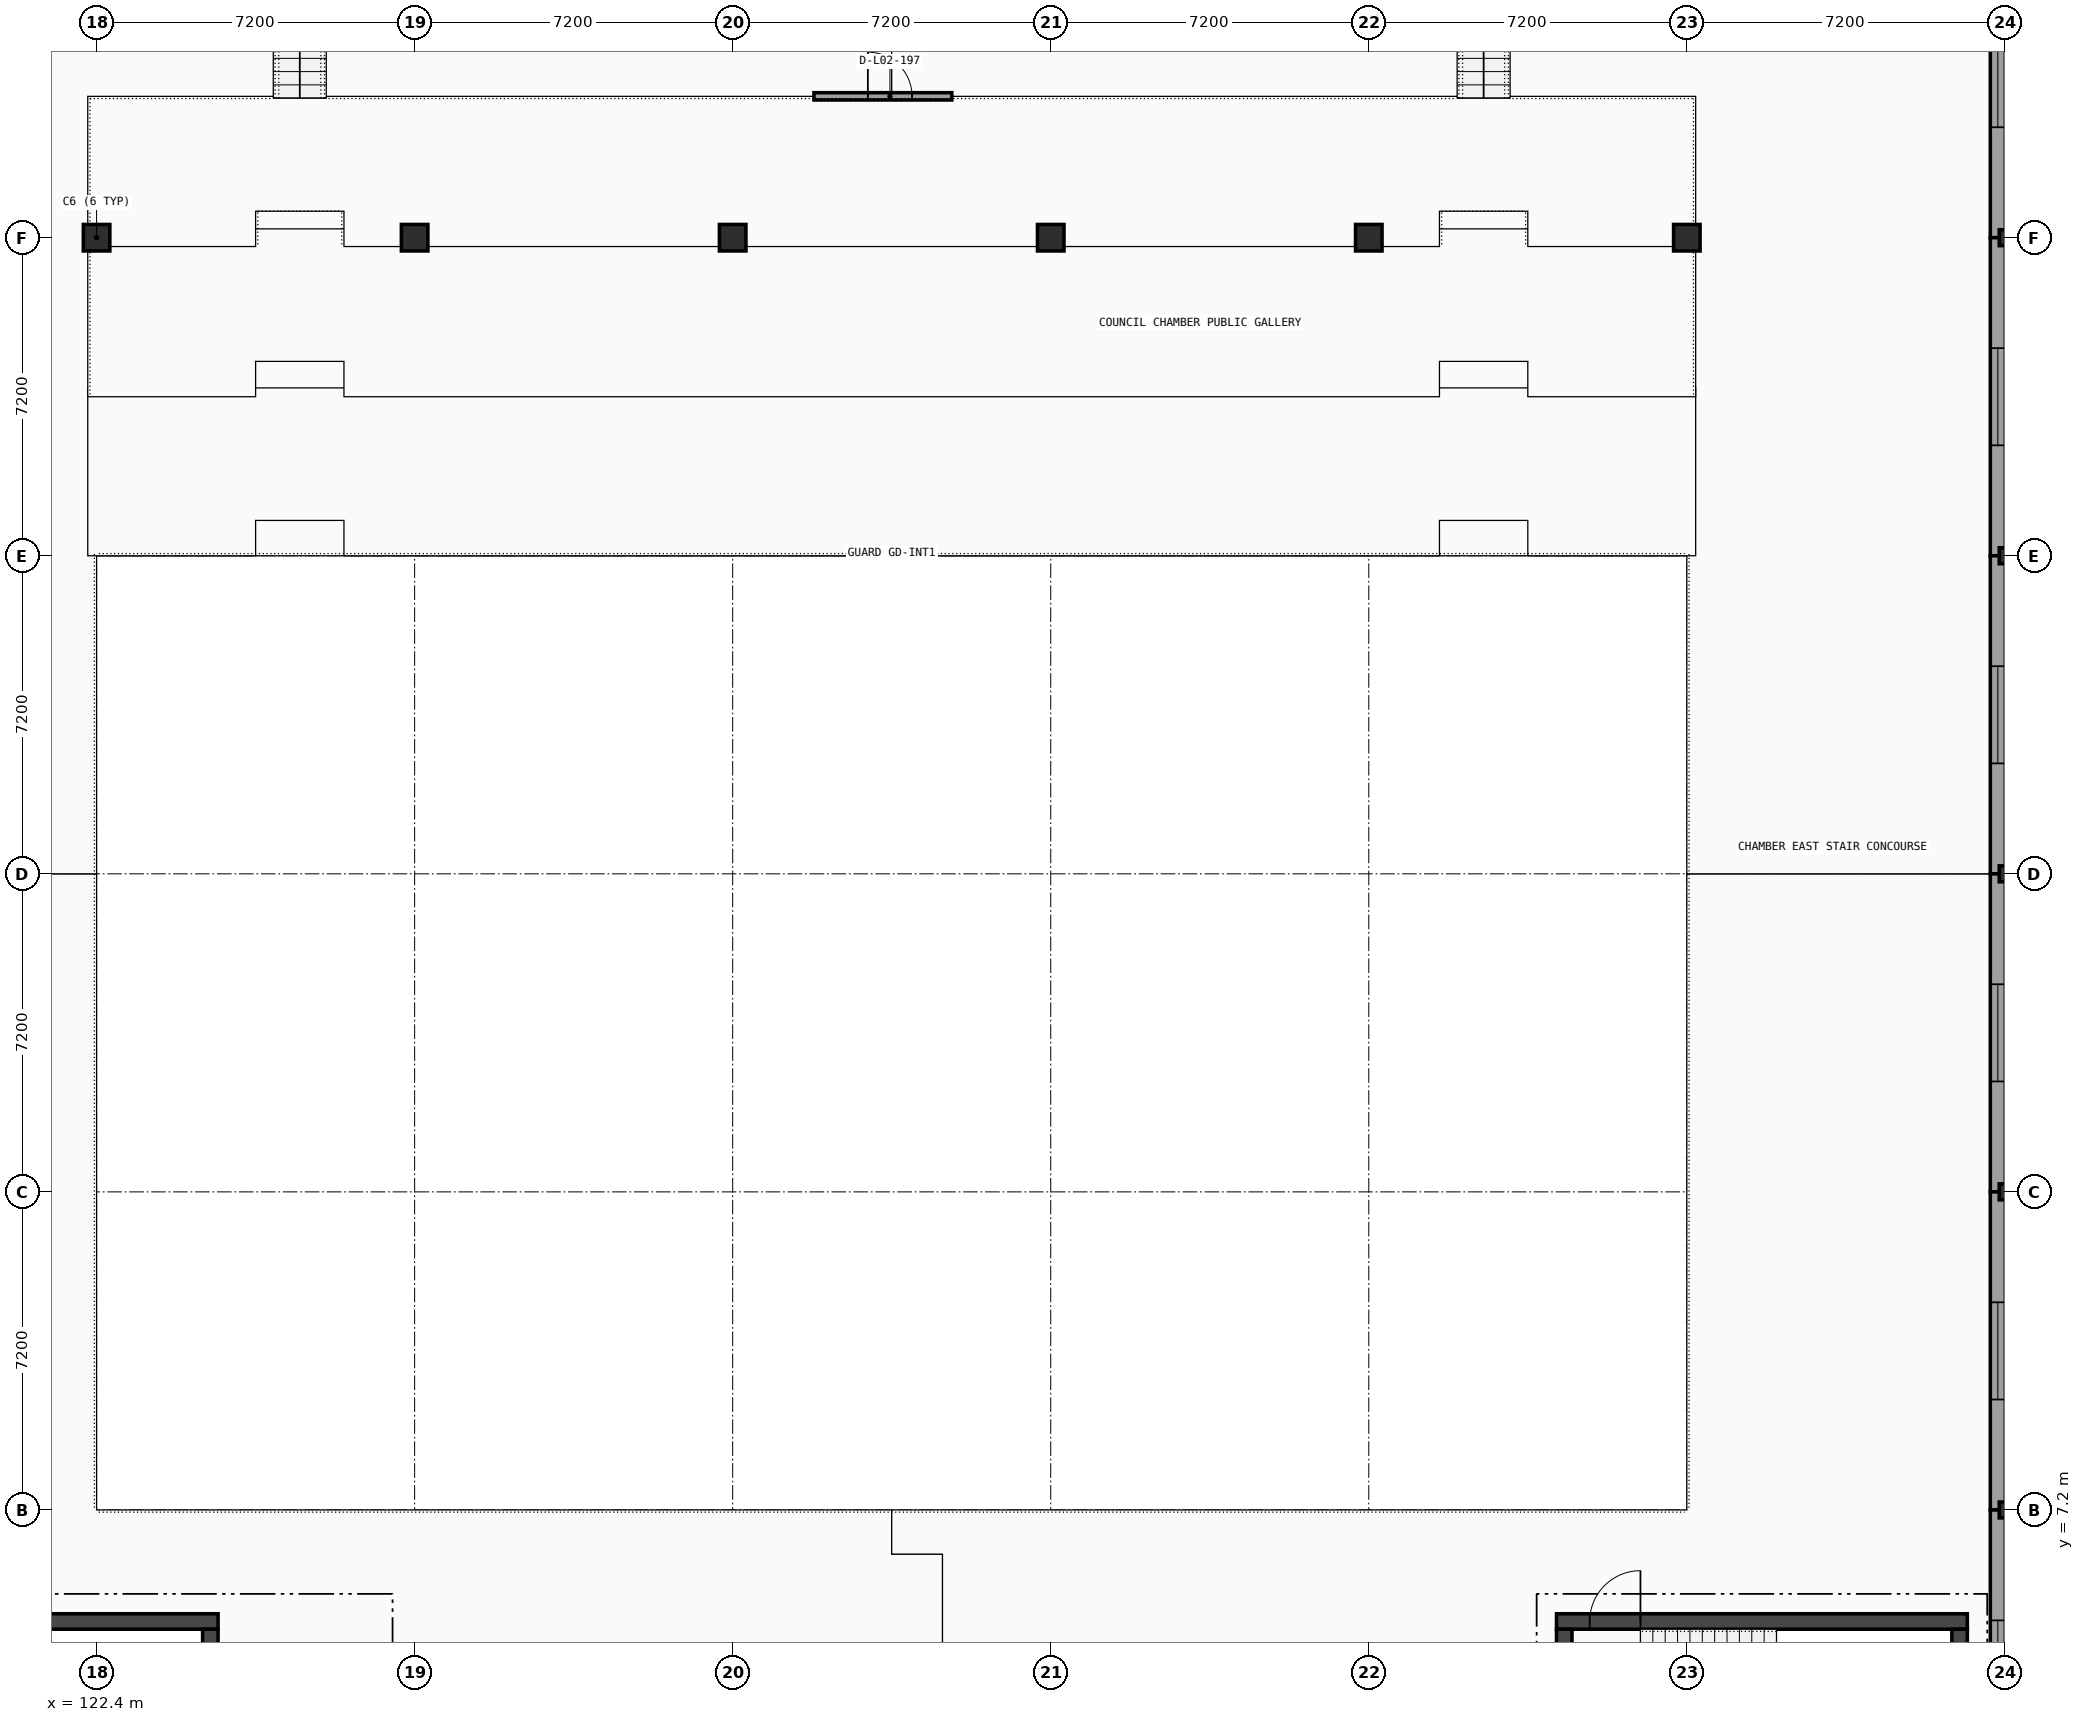
"""IFC4 building model, lengths in metres.
Left out: names, types, materials, properties, quantities, classifications, styles, units other than length and angle.
Written with IfcOpenShell. Run it as: python <this file> out.ifc"""

import sys

from ifc_helpers import new_model, si_unit, direction, frame, frame_2d, origin, origin_2d, place, context, subcontext, project, spatial, rectangle, i_section, extrude, element, fill, save


model = new_model("IFC4")
c1 = context("Model", 3, precision=1e-05, world=origin(), true_north=direction((0.0, 1.0)))
c2 = subcontext(c1, "Body", "Model", "MODEL_VIEW")
j1 = project(units=[si_unit("LENGTHUNIT", "METRE"), si_unit("PLANEANGLEUNIT", "RADIAN")], contexts=[c1])
p1 = place(None, origin())
s1 = spatial("IfcSite", under=j1, at=p1, CompositionType="ELEMENT")
p2 = place(p1, origin())
s2 = spatial("IfcBuilding", under=s1, at=p2, CompositionType="ELEMENT")
p3 = place(p2, frame((0.0, 0.0, 10.2)))
s3 = spatial("IfcBuildingStorey", under=s2, at=p3, CompositionType="ELEMENT", Elevation=10.2)
for number, where, z_axis, x_axis in (
    (1, (122.4, 36.0, 0.0), (0.0, 0.0, 1.0), (1.0, 0.0, 0.0)),
    (2, (158.4, 36.0, 0.0), (0.0, 0.0, 1.0), (1.0, 0.0, 0.0)),
):
    element("IfcColumn", number, at=place(p3, frame(where, z_axis=z_axis, x_axis=x_axis)), inside=s3, PredefinedType="COLUMN", context=c2, shape_type="SweptSolid", body=[
        extrude(rectangle(XDim=0.6, YDim=0.6, at=origin_2d()), origin(), (0.0, 0.0, 1.0), 4.5),
    ])
for number, where, z_axis, x_axis in (
    (3, (165.6, 7.2, 0.0), (0.0, 0.0, 1.0), (1.0, 0.0, 0.0)),
    (4, (165.6, 14.4, 0.0), (0.0, 0.0, 1.0), (1.0, 0.0, 0.0)),
    (5, (165.6, 21.6, 0.0), (0.0, 0.0, 1.0), (1.0, 0.0, 0.0)),
    (6, (165.6, 28.8, 0.0), (0.0, 0.0, 1.0), (1.0, 0.0, 0.0)),
    (7, (165.6, 36.0, 0.0), (0.0, 0.0, 1.0), (1.0, 0.0, 0.0)),
):
    element("IfcColumn", number, at=place(p3, frame(where, z_axis=z_axis, x_axis=x_axis)), inside=s3, PredefinedType="COLUMN", context=c2, shape_type="SweptSolid", body=[
        extrude(i_section(OverallWidth=0.256, OverallDepth=0.36, WebThickness=0.011, FlangeThickness=0.02, FilletRadius=0.015, at=origin_2d()), origin(), (0.0, 0.0, 1.0), 4.5),
    ])
for number, where, z_axis, x_axis in (
    (8, (129.6, 36.0, 0.0), (0.0, 0.0, 1.0), (1.0, 0.0, 0.0)),
    (9, (136.8, 36.0, 0.0), (0.0, 0.0, 1.0), (1.0, 0.0, 0.0)),
    (10, (144.0, 36.0, 0.0), (0.0, 0.0, 1.0), (1.0, 0.0, 0.0)),
    (11, (151.2, 36.0, 0.0), (0.0, 0.0, 1.0), (1.0, 0.0, 0.0)),
):
    element("IfcColumn", number, at=place(p3, frame(where, z_axis=z_axis, x_axis=x_axis)), inside=s3, PredefinedType="COLUMN", context=c2, shape_type="SweptSolid", body=[
        extrude(rectangle(XDim=0.6, YDim=0.6, at=origin_2d()), origin(), (0.0, 0.0, 1.0), 1.28),
    ])
p4 = place(p3, frame((165.44, 43.2, 0.0), z_axis=(0.0, 0.0, 1.0), x_axis=(0.0, -1.0, 0.0)))
e12 = element("IfcWall", 12, at=p4, inside=s3, PredefinedType="SOLIDWALL", context=c2, shape_type="SweptSolid", body=[
    extrude(rectangle(XDim=7.2, YDim=0.34, at=frame_2d((3.6, 0.0))), origin(), (0.0, 0.0, 1.0), 3.471),
])
p5 = place(p4, frame((2.5, 0.0, 1.4)))
e13 = element("IfcOpeningElement", 13, at=p5, cuts=e12, PredefinedType="OPENING", context=c2, shape_type="SweptSolid", body=[
    extrude(rectangle(XDim=2.2, YDim=1.05, at=frame_2d((1.1, 0.525))), frame((0.0, 0.18, 0.0), z_axis=(0.0, -1.0, 0.0), x_axis=(1.0, 0.0, 0.0)), (0.0, 0.0, 1.0), 0.36),
])
p6 = place(p3, frame((165.44, 36.0, 0.0), z_axis=(0.0, 0.0, 1.0), x_axis=(0.0, -1.0, 0.0)))
e14 = element("IfcWall", 14, at=p6, inside=s3, PredefinedType="SOLIDWALL", context=c2, shape_type="SweptSolid", body=[
    extrude(rectangle(XDim=7.2, YDim=0.34, at=frame_2d((3.6, 0.0))), origin(), (0.0, 0.0, 1.0), 3.618),
])
p7 = place(p6, frame((2.5, 0.0, 1.4)))
e15 = element("IfcOpeningElement", 15, at=p7, cuts=e14, PredefinedType="OPENING", context=c2, shape_type="SweptSolid", body=[
    extrude(rectangle(XDim=2.2, YDim=1.05, at=frame_2d((1.1, 0.525))), frame((0.0, 0.18, 0.0), z_axis=(0.0, -1.0, 0.0), x_axis=(1.0, 0.0, 0.0)), (0.0, 0.0, 1.0), 0.36),
])
p8 = place(p3, frame((165.44, 28.8, 0.0), z_axis=(0.0, 0.0, 1.0), x_axis=(0.0, -1.0, 0.0)))
e16 = element("IfcWall", 16, at=p8, inside=s3, PredefinedType="SOLIDWALL", context=c2, shape_type="SweptSolid", body=[
    extrude(rectangle(XDim=7.2, YDim=0.34, at=frame_2d((3.6, 0.0))), origin(), (0.0, 0.0, 1.0), 3.696),
])
p9 = place(p8, frame((2.5, 0.0, 1.4)))
e17 = element("IfcOpeningElement", 17, at=p9, cuts=e16, PredefinedType="OPENING", context=c2, shape_type="SweptSolid", body=[
    extrude(rectangle(XDim=2.2, YDim=1.05, at=frame_2d((1.1, 0.525))), frame((0.0, 0.18, 0.0), z_axis=(0.0, -1.0, 0.0), x_axis=(1.0, 0.0, 0.0)), (0.0, 0.0, 1.0), 0.36),
])
p10 = place(p3, frame((165.44, 21.6, 0.0), z_axis=(0.0, 0.0, 1.0), x_axis=(0.0, -1.0, 0.0)))
e18 = element("IfcWall", 18, at=p10, inside=s3, PredefinedType="SOLIDWALL", context=c2, shape_type="SweptSolid", body=[
    extrude(rectangle(XDim=7.2, YDim=0.34, at=frame_2d((3.6, 0.0))), origin(), (0.0, 0.0, 1.0), 3.696),
])
p11 = place(p10, frame((2.5, 0.0, 1.4)))
e19 = element("IfcOpeningElement", 19, at=p11, cuts=e18, PredefinedType="OPENING", context=c2, shape_type="SweptSolid", body=[
    extrude(rectangle(XDim=2.2, YDim=1.05, at=frame_2d((1.1, 0.525))), frame((0.0, 0.18, 0.0), z_axis=(0.0, -1.0, 0.0), x_axis=(1.0, 0.0, 0.0)), (0.0, 0.0, 1.0), 0.36),
])
p12 = place(p3, frame((165.44, 14.4, 0.0), z_axis=(0.0, 0.0, 1.0), x_axis=(0.0, -1.0, 0.0)))
e20 = element("IfcWall", 20, at=p12, inside=s3, PredefinedType="SOLIDWALL", context=c2, shape_type="SweptSolid", body=[
    extrude(rectangle(XDim=7.2, YDim=0.34, at=frame_2d((3.6, 0.0))), origin(), (0.0, 0.0, 1.0), 3.696),
])
p13 = place(p12, frame((2.5, 0.0, 1.4)))
e21 = element("IfcOpeningElement", 21, at=p13, cuts=e20, PredefinedType="OPENING", context=c2, shape_type="SweptSolid", body=[
    extrude(rectangle(XDim=2.2, YDim=1.05, at=frame_2d((1.1, 0.525))), frame((0.0, 0.18, 0.0), z_axis=(0.0, -1.0, 0.0), x_axis=(1.0, 0.0, 0.0)), (0.0, 0.0, 1.0), 0.36),
])
p14 = place(p3, frame((165.44, 7.2, 0.0), z_axis=(0.0, 0.0, 1.0), x_axis=(0.0, -1.0, 0.0)))
e22 = element("IfcWall", 22, at=p14, inside=s3, PredefinedType="SOLIDWALL", context=c2, shape_type="SweptSolid", body=[
    extrude(rectangle(XDim=7.2, YDim=0.34, at=frame_2d((3.6, 0.0))), origin(), (0.0, 0.0, 1.0), 3.471),
])
p15 = place(p14, frame((2.5, 0.0, 1.4)))
e23 = element("IfcOpeningElement", 23, at=p15, cuts=e22, PredefinedType="OPENING", context=c2, shape_type="SweptSolid", body=[
    extrude(rectangle(XDim=2.2, YDim=1.05, at=frame_2d((1.1, 0.525))), frame((0.0, 0.18, 0.0), z_axis=(0.0, -1.0, 0.0), x_axis=(1.0, 0.0, 0.0)), (0.0, 0.0, 1.0), 0.36),
])
p16 = place(p3, frame((125.15, 4.675, 0.0), z_axis=(0.0, 0.0, 1.0), x_axis=(-1.0, 0.0, 0.0)))
e24 = element("IfcWall", 24, at=p16, inside=s3, PredefinedType="SHEAR", context=c2, shape_type="SweptSolid", body=[
    extrude(rectangle(XDim=9.3, YDim=0.35, at=frame_2d((4.65, 0.0))), origin(), (0.0, 0.0, 1.0), 4.24),
])
p17 = place(p16, frame((7.4, 0.0, 0.0)))
e25 = element("IfcOpeningElement", 25, at=p17, cuts=e24, PredefinedType="OPENING", context=c2, shape_type="SweptSolid", body=[
    extrude(rectangle(XDim=1.15, YDim=2.1, at=frame_2d((0.575, 1.05))), frame((0.0, 0.185, 0.0), z_axis=(0.0, -1.0, 0.0), x_axis=(1.0, 0.0, 0.0)), (0.0, 0.0, 1.0), 0.37),
])
p18 = place(p3, frame((124.975, 1.2, 0.0), z_axis=(0.0, 0.0, 1.0), x_axis=(0.0, 1.0, 0.0)))
e26 = element("IfcWall", 26, at=p18, inside=s3, PredefinedType="SHEAR", context=c2, shape_type="SweptSolid", body=[
    extrude(rectangle(XDim=3.3, YDim=0.35, at=frame_2d((1.65, 0.0))), origin(), (0.0, 0.0, 1.0), 4.24),
])
p19 = place(p3, frame((164.75, 4.675, 0.0), z_axis=(0.0, 0.0, 1.0), x_axis=(-1.0, 0.0, 0.0)))
e27 = element("IfcWall", 27, at=p19, inside=s3, PredefinedType="SHEAR", context=c2, shape_type="SweptSolid", body=[
    extrude(rectangle(XDim=9.3, YDim=0.35, at=frame_2d((4.65, 0.0))), origin(), (0.0, 0.0, 1.0), 4.24),
])
p20 = place(p19, frame((7.4, 0.0, 0.0)))
e28 = element("IfcOpeningElement", 28, at=p20, cuts=e27, PredefinedType="OPENING", context=c2, shape_type="SweptSolid", body=[
    extrude(rectangle(XDim=1.15, YDim=2.1, at=frame_2d((0.575, 1.05))), frame((0.0, 0.185, 0.0), z_axis=(0.0, -1.0, 0.0), x_axis=(1.0, 0.0, 0.0)), (0.0, 0.0, 1.0), 0.37),
])
for number, where, z_axis, x_axis in (
    (29, (155.625, 4.5, 0.0), (0.0, 0.0, 1.0), (0.0, -1.0, 0.0)),
    (30, (164.575, 1.2, 0.0), (0.0, 0.0, 1.0), (0.0, 1.0, 0.0)),
):
    element("IfcWall", number, at=place(p3, frame(where, z_axis=z_axis, x_axis=x_axis)), inside=s3, PredefinedType="SHEAR", context=c2, shape_type="SweptSolid", body=[
        extrude(rectangle(XDim=3.3, YDim=0.35, at=frame_2d((1.65, 0.0))), origin(), (0.0, 0.0, 1.0), 4.24),
    ])
p21 = place(p3, frame((138.64, 39.2, 0.0), z_axis=(0.0, 0.0, 1.0), x_axis=(1.0, 0.0, 0.0)))
e31 = element("IfcWall", 31, at=p21, inside=s3, PredefinedType="PARTITIONING", context=c2, shape_type="SweptSolid", body=[
    extrude(rectangle(XDim=3.12, YDim=0.165, at=frame_2d((1.56, 0.0))), origin(), (0.0, 0.0, 1.0), 4.24),
])
p22 = place(p21, frame((1.22, 0.0, 0.0)))
e32 = element("IfcOpeningElement", 32, at=p22, cuts=e31, PredefinedType="OPENING", context=c2, shape_type="SweptSolid", body=[
    extrude(rectangle(XDim=1.0, YDim=2.1, at=frame_2d((0.5, 1.05))), frame((0.0, 0.093, 0.0), z_axis=(0.0, -1.0, 0.0), x_axis=(1.0, 0.0, 0.0)), (0.0, 0.0, 1.0), 0.185),
])
p23 = place(p5, origin())
e33 = element("IfcWindow", 33, at=p23, inside=s3, PartitioningType="SINGLE_PANEL", PredefinedType="WINDOW", context=c2, shape_type="SweptSolid", body=[
    extrude(rectangle(XDim=2.2, YDim=1.05, at=frame_2d((1.1, 0.525))), frame((0.0, 0.03, 0.0), z_axis=(0.0, -1.0, 0.0), x_axis=(1.0, 0.0, 0.0)), (0.0, 0.0, 1.0), 0.06),
])
fill(e13, e33)
p24 = place(p7, origin())
e34 = element("IfcWindow", 34, at=p24, inside=s3, PartitioningType="SINGLE_PANEL", PredefinedType="WINDOW", context=c2, shape_type="SweptSolid", body=[
    extrude(rectangle(XDim=2.2, YDim=1.05, at=frame_2d((1.1, 0.525))), frame((0.0, 0.03, 0.0), z_axis=(0.0, -1.0, 0.0), x_axis=(1.0, 0.0, 0.0)), (0.0, 0.0, 1.0), 0.06),
])
fill(e15, e34)
p25 = place(p9, origin())
e35 = element("IfcWindow", 35, at=p25, inside=s3, PartitioningType="SINGLE_PANEL", PredefinedType="WINDOW", context=c2, shape_type="SweptSolid", body=[
    extrude(rectangle(XDim=2.2, YDim=1.05, at=frame_2d((1.1, 0.525))), frame((0.0, 0.03, 0.0), z_axis=(0.0, -1.0, 0.0), x_axis=(1.0, 0.0, 0.0)), (0.0, 0.0, 1.0), 0.06),
])
fill(e17, e35)
p26 = place(p11, origin())
e36 = element("IfcWindow", 36, at=p26, inside=s3, PartitioningType="SINGLE_PANEL", PredefinedType="WINDOW", context=c2, shape_type="SweptSolid", body=[
    extrude(rectangle(XDim=2.2, YDim=1.05, at=frame_2d((1.1, 0.525))), frame((0.0, 0.03, 0.0), z_axis=(0.0, -1.0, 0.0), x_axis=(1.0, 0.0, 0.0)), (0.0, 0.0, 1.0), 0.06),
])
fill(e19, e36)
p27 = place(p13, origin())
e37 = element("IfcWindow", 37, at=p27, inside=s3, PartitioningType="SINGLE_PANEL", PredefinedType="WINDOW", context=c2, shape_type="SweptSolid", body=[
    extrude(rectangle(XDim=2.2, YDim=1.05, at=frame_2d((1.1, 0.525))), frame((0.0, 0.03, 0.0), z_axis=(0.0, -1.0, 0.0), x_axis=(1.0, 0.0, 0.0)), (0.0, 0.0, 1.0), 0.06),
])
fill(e21, e37)
p28 = place(p15, origin())
e38 = element("IfcWindow", 38, at=p28, inside=s3, PartitioningType="SINGLE_PANEL", PredefinedType="WINDOW", context=c2, shape_type="SweptSolid", body=[
    extrude(rectangle(XDim=2.2, YDim=1.05, at=frame_2d((1.1, 0.525))), frame((0.0, 0.03, 0.0), z_axis=(0.0, -1.0, 0.0), x_axis=(1.0, 0.0, 0.0)), (0.0, 0.0, 1.0), 0.06),
])
fill(e23, e38)
p29 = place(p20, frame((1.15, 0.0, 0.0), z_axis=(0.0, 0.0, 1.0), x_axis=(-1.0, 0.0, 0.0)))
e39 = element("IfcDoor", 39, at=p29, inside=s3, OperationType="SINGLE_SWING_RIGHT", PredefinedType="DOOR", context=c2, shape_type="SweptSolid", body=[
    extrude(rectangle(XDim=1.15, YDim=2.1, at=frame_2d((0.575, 1.05))), frame((0.0, 0.025, 0.0), z_axis=(0.0, -1.0, 0.0), x_axis=(1.0, 0.0, 0.0)), (0.0, 0.0, 1.0), 0.05),
])
fill(e28, e39)
p30 = place(p22, origin())
e40 = element("IfcDoor", 40, at=p30, inside=s3, OperationType="SINGLE_SWING_LEFT", PredefinedType="DOOR", context=c2, shape_type="SweptSolid", body=[
    extrude(rectangle(XDim=1.0, YDim=2.1, at=frame_2d((0.5, 1.05))), frame((0.0, 0.025, 0.0), z_axis=(0.0, -1.0, 0.0), x_axis=(1.0, 0.0, 0.0)), (0.0, 0.0, 1.0), 0.05),
])
fill(e32, e40)
save(model, sys.argv[1])
